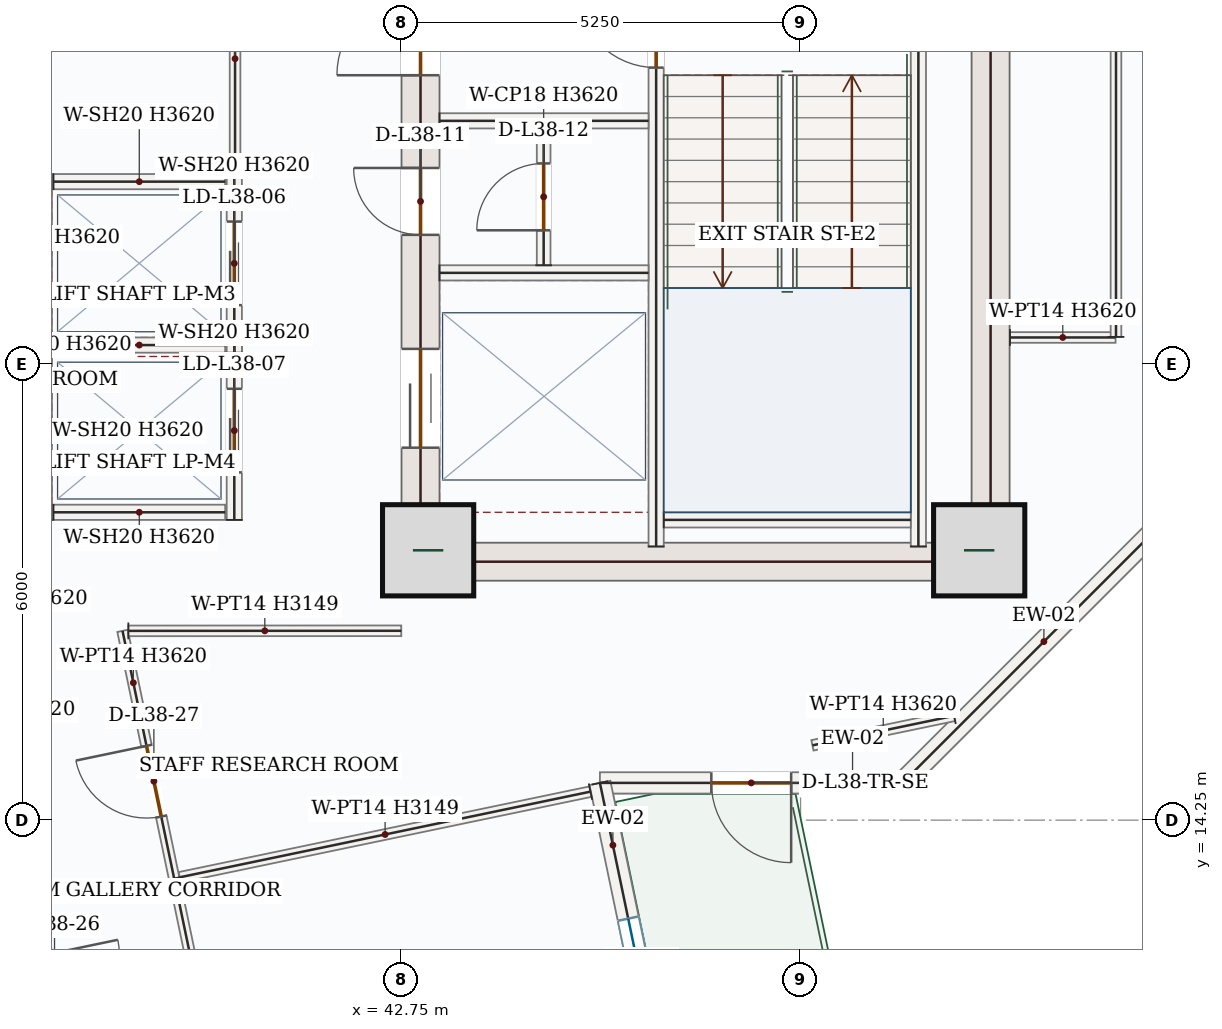
"""IFC4 building model, lengths in metres.
Left out: names, types, materials, properties, quantities, classifications, styles, units other than length and angle.
Written with IfcOpenShell. Run it as: python <this file> out.ifc"""

import sys

from ifc_helpers import new_model, si_unit, direction, frame, frame_2d, origin, origin_2d, place, context, subcontext, project, spatial, rectangle, extrude, source, transform, mapped, element, fill, save


model = new_model("IFC4")
c1 = context("Model", 3, precision=1e-05, world=origin(), true_north=direction((0.0, 1.0)))
c2 = subcontext(c1, "Body", "Model", "MODEL_VIEW")
j1 = project(units=[si_unit("LENGTHUNIT", "METRE"), si_unit("PLANEANGLEUNIT", "RADIAN")], contexts=[c1])
p1 = place(None, origin())
s1 = spatial("IfcSite", under=j1, at=p1, CompositionType="ELEMENT")
p2 = place(p1, origin())
s2 = spatial("IfcBuilding", under=s1, at=p2, CompositionType="ELEMENT")
p3 = place(p2, frame((0.0, 0.0, 166.8)))
s3 = spatial("IfcBuildingStorey", under=s2, at=p3, CompositionType="ELEMENT", Elevation=166.8)
p4 = place(p3, frame((43.0, 17.4, 0.0), z_axis=(0.0, 0.0, 1.0), x_axis=(0.0, 1.0, 0.0)))
e1 = element("IfcWall", 1, at=p4, inside=s3, PredefinedType="SHEAR", context=c2, shape_type="SweptSolid", body=[
    extrude(rectangle(XDim=8.55, YDim=0.5, at=frame_2d((4.275, 0.0))), origin(), (0.0, 0.0, 1.0), 3.62),
])
p5 = place(p4, frame((6.65, 0.0, 0.0)))
e2 = element("IfcOpeningElement", 2, at=p5, cuts=e1, PredefinedType="OPENING", context=c2, shape_type="SweptSolid", body=[
    extrude(rectangle(XDim=1.1, YDim=2.2, at=frame_2d((0.55, 1.1))), frame((0.0, 0.26, 0.0), z_axis=(0.0, -1.0, 0.0), x_axis=(1.0, 0.0, 0.0)), (0.0, 0.0, 1.0), 0.52),
])
p6 = place(p4, frame((1.75, 0.0, 0.0)))
e3 = element("IfcOpeningElement", 3, at=p6, cuts=e1, PredefinedType="OPENING", context=c2, shape_type="SweptSolid", body=[
    extrude(rectangle(XDim=1.3, YDim=2.2, at=frame_2d((0.65, 1.1))), frame((0.0, 0.26, 0.0), z_axis=(0.0, -1.0, 0.0), x_axis=(1.0, 0.0, 0.0)), (0.0, 0.0, 1.0), 0.52),
])
p7 = place(p4, frame((4.55, 0.0, 0.0)))
e4 = element("IfcOpeningElement", 4, at=p7, cuts=e1, PredefinedType="OPENING", context=c2, shape_type="SweptSolid", body=[
    extrude(rectangle(XDim=0.88, YDim=2.1, at=frame_2d((0.44, 1.05))), frame((0.0, 0.26, 0.0), z_axis=(0.0, -1.0, 0.0), x_axis=(1.0, 0.0, 0.0)), (0.0, 0.0, 1.0), 0.52),
])
m1 = source(origin(), c2, "Body", "SweptSolid", [
    extrude(rectangle(XDim=8.55, YDim=0.5, at=frame_2d((4.275, 0.0))), origin(), (0.0, 0.0, 1.0), 3.62),
])
p8 = place(p3, frame((50.5, 17.4, 0.0), z_axis=(0.0, 0.0, 1.0), x_axis=(0.0, 1.0, 0.0)))
e5 = element("IfcWall", 5, at=p8, inside=s3, PredefinedType="SHEAR", context=c2, shape_type="MappedRepresentation", body=[
    mapped(m1, transform((0.0, 0.0, 0.0), x_axis=(1.0, 0.0, 0.0), y_axis=(0.0, 1.0, 0.0), z_axis=(0.0, 0.0, 1.0), scale=1.0)),
])
m2 = source(origin(), c2, "Body", "SweptSolid", [
    extrude(rectangle(XDim=7.0, YDim=0.5, at=frame_2d((3.5, 0.0))), origin(), (0.0, 0.0, 1.0), 3.62),
])
p9 = place(p3, frame((43.25, 17.65, 0.0), z_axis=(0.0, 0.0, 1.0), x_axis=(1.0, 0.0, 0.0)))
e6 = element("IfcWall", 6, at=p9, inside=s3, PredefinedType="SHEAR", context=c2, shape_type="MappedRepresentation", body=[
    mapped(m2, transform((0.0, 0.0, 0.0), x_axis=(1.0, 0.0, 0.0), y_axis=(0.0, 1.0, 0.0), z_axis=(0.0, 0.0, 1.0), scale=1.0)),
])
m3 = source(origin(), c2, "Body", "SweptSolid", [
    extrude(rectangle(XDim=1.2, YDim=1.2, at=origin_2d()), origin(), (0.0, 0.0, 1.0), 3.9),
])
for number, where, z_axis, x_axis in (
    (7, (43.1, 17.8, 0.0), (0.0, 0.0, 1.0), (1.0, 0.0, 0.0)),
    (8, (50.35, 17.8, 0.0), (0.0, 0.0, 1.0), (1.0, 0.0, 0.0)),
):
    element("IfcColumn", number, at=place(p3, frame(where, z_axis=z_axis, x_axis=x_axis)), inside=s3, PredefinedType="COLUMN", context=c2, shape_type="MappedRepresentation", body=[
        mapped(m3, transform((0.0, 0.0, 0.0), x_axis=(1.0, 0.0, 0.0), y_axis=(0.0, 1.0, 0.0), z_axis=(0.0, 0.0, 1.0), scale=1.0)),
    ])
m4 = source(origin(), c2, "Body", "SweptSolid", [
    extrude(rectangle(XDim=5.258, YDim=0.28, at=frame_2d((2.629, 0.0))), origin(), (0.0, 0.0, 1.0), 3.62),
])
p10 = place(p3, frame((53.06, 18.458, 0.0), z_axis=(0.0, 0.0, 1.0), x_axis=(-0.707106781187, -0.707106781187, 0.0)))
e9 = element("IfcWall", 9, at=p10, inside=s3, PredefinedType="SOLIDWALL", context=c2, shape_type="MappedRepresentation", body=[
    mapped(m4, transform((0.0, 0.0, 0.0), x_axis=(1.0, 0.0, 0.0), y_axis=(0.0, 1.0, 0.0), z_axis=(0.0, 0.0, 1.0), scale=1.0)),
])
p11 = place(p3, frame((49.342, 14.74, 0.0), z_axis=(0.0, 0.0, 1.0), x_axis=(-1.0, 0.0, 0.0)))
e10 = element("IfcWall", 10, at=p11, inside=s3, PredefinedType="SOLIDWALL", context=c2, shape_type="SweptSolid", body=[
    extrude(rectangle(XDim=3.982, YDim=0.28, at=frame_2d((1.991, 0.0))), origin(), (0.0, 0.0, 1.0), 3.62),
])
p12 = place(p11, frame((1.466, 0.0, 0.0)))
e11 = element("IfcOpeningElement", 11, at=p12, cuts=e10, PredefinedType="OPENING", context=c2, shape_type="SweptSolid", body=[
    extrude(rectangle(XDim=1.05, YDim=2.15, at=frame_2d((0.525, 1.075))), frame((0.0, 0.15, 0.0), z_axis=(0.0, -1.0, 0.0), x_axis=(1.0, 0.0, 0.0)), (0.0, 0.0, 1.0), 0.3),
])
p13 = place(p3, frame((45.36, 14.74, 0.0), z_axis=(0.0, 0.0, 1.0), x_axis=(0.204151126022, -0.978939384101, 0.0)))
e12 = element("IfcWall", 12, at=p13, inside=s3, PredefinedType="SOLIDWALL", context=c2, shape_type="SweptSolid", body=[
    extrude(rectangle(XDim=5.447, YDim=0.28, at=frame_2d((2.724, 0.0))), origin(), (0.0, 0.0, 1.0), 3.62),
])
p14 = place(p13, frame((1.824, 0.0, 0.85)))
e13 = element("IfcOpeningElement", 13, at=p14, cuts=e12, PredefinedType="OPENING", context=c2, shape_type="SweptSolid", body=[
    extrude(rectangle(XDim=1.8, YDim=1.75, at=frame_2d((0.9, 0.875))), frame((0.0, 0.15, 0.0), z_axis=(0.0, -1.0, 0.0), x_axis=(1.0, 0.0, 0.0)), (0.0, 0.0, 1.0), 0.3),
])
m5 = source(origin(), c2, "Body", "SweptSolid", [
    extrude(rectangle(XDim=7.87, YDim=0.2, at=frame_2d((3.935, 0.0))), origin(), (0.0, 0.0, 1.0), 3.62),
])
p15 = place(p3, frame((49.55, 17.85, 0.0), z_axis=(0.0, 0.0, 1.0), x_axis=(0.0, 1.0, 0.0)))
e14 = element("IfcWall", 14, at=p15, inside=s3, PredefinedType="SOLIDWALL", context=c2, shape_type="MappedRepresentation", body=[
    mapped(m5, transform((0.0, 0.0, 0.0), x_axis=(1.0, 0.0, 0.0), y_axis=(0.0, 1.0, 0.0), z_axis=(0.0, 0.0, 1.0), scale=1.0)),
])
p16 = place(p3, frame((46.1, 17.85, 0.0), z_axis=(0.0, 0.0, 1.0), x_axis=(0.0, 1.0, 0.0)))
e15 = element("IfcWall", 15, at=p16, inside=s3, PredefinedType="SOLIDWALL", context=c2, shape_type="SweptSolid", body=[
    extrude(rectangle(XDim=8.0, YDim=0.2, at=frame_2d((4.0, 0.0))), origin(), (0.0, 0.0, 1.0), 3.62),
])
p17 = place(p16, frame((6.3, 0.0, 0.0)))
e16 = element("IfcOpeningElement", 16, at=p17, cuts=e15, PredefinedType="OPENING", context=c2, shape_type="SweptSolid", body=[
    extrude(rectangle(XDim=1.05, YDim=2.15, at=frame_2d((0.525, 1.075))), frame((0.0, 0.11, 0.0), z_axis=(0.0, -1.0, 0.0), x_axis=(1.0, 0.0, 0.0)), (0.0, 0.0, 1.0), 0.22),
])
m6 = source(origin(), c2, "Body", "SweptSolid", [
    extrude(rectangle(XDim=3.25, YDim=0.2, at=frame_2d((1.625, 0.0))), origin(), (0.0, 0.0, 1.0), 3.62),
])
p18 = place(p3, frame((46.2, 18.2, 0.0), z_axis=(0.0, 0.0, 1.0), x_axis=(1.0, 0.0, 0.0)))
e17 = element("IfcWall", 17, at=p18, inside=s3, PredefinedType="SOLIDWALL", context=c2, shape_type="MappedRepresentation", body=[
    mapped(m6, transform((0.0, 0.0, 0.0), x_axis=(1.0, 0.0, 0.0), y_axis=(0.0, 1.0, 0.0), z_axis=(0.0, 0.0, 1.0), scale=1.0)),
])
m7 = source(origin(), c2, "Body", "SweptSolid", [
    extrude(rectangle(XDim=2.75, YDim=0.2, at=frame_2d((1.375, 0.0))), origin(), (0.0, 0.0, 1.0), 3.62),
])
for number, where, z_axis, x_axis in (
    (18, (43.25, 23.45, 0.0), (0.0, 0.0, 1.0), (1.0, 0.0, 0.0)),
    (19, (43.25, 21.45, 0.0), (0.0, 0.0, 1.0), (1.0, 0.0, 0.0)),
):
    element("IfcWall", number, at=place(p3, frame(where, z_axis=z_axis, x_axis=x_axis)), inside=s3, PredefinedType="SOLIDWALL", context=c2, shape_type="MappedRepresentation", body=[
        mapped(m7, transform((0.0, 0.0, 0.0), x_axis=(1.0, 0.0, 0.0), y_axis=(0.0, 1.0, 0.0), z_axis=(0.0, 0.0, 1.0), scale=1.0)),
    ])
p19 = place(p3, frame((44.62, 21.55, 0.0), z_axis=(0.0, 0.0, 1.0), x_axis=(0.0, 1.0, 0.0)))
e20 = element("IfcWall", 20, at=p19, inside=s3, PredefinedType="PARTITIONING", context=c2, shape_type="SweptSolid", body=[
    extrude(rectangle(XDim=1.8, YDim=0.18, at=frame_2d((0.9, 0.0))), origin(), (0.0, 0.0, 1.0), 3.62),
])
p20 = place(p19, frame((0.46, 0.0, 0.0)))
e21 = element("IfcOpeningElement", 21, at=p20, cuts=e20, PredefinedType="OPENING", context=c2, shape_type="SweptSolid", body=[
    extrude(rectangle(XDim=0.88, YDim=2.1, at=frame_2d((0.44, 1.05))), frame((0.0, 0.1, 0.0), z_axis=(0.0, -1.0, 0.0), x_axis=(1.0, 0.0, 0.0)), (0.0, 0.0, 1.0), 0.2),
])
p21 = place(p3, frame((40.55, 20.4, 0.0), z_axis=(0.0, 0.0, 1.0), x_axis=(0.0, 1.0, 0.0)))
e22 = element("IfcWall", 22, at=p21, inside=s3, PredefinedType="SOLIDWALL", context=c2, shape_type="SweptSolid", body=[
    extrude(rectangle(XDim=2.35, YDim=0.2, at=frame_2d((1.175, 0.0))), origin(), (0.0, 0.0, 1.0), 3.62),
])
p22 = place(p21, frame((0.625, 0.0, 0.0)))
e23 = element("IfcOpeningElement", 23, at=p22, cuts=e22, PredefinedType="OPENING", context=c2, shape_type="SweptSolid", body=[
    extrude(rectangle(XDim=1.1, YDim=2.15, at=frame_2d((0.55, 1.075))), frame((0.0, 0.11, 0.0), z_axis=(0.0, -1.0, 0.0), x_axis=(1.0, 0.0, 0.0)), (0.0, 0.0, 1.0), 0.22),
])
m8 = source(origin(), c2, "Body", "SweptSolid", [
    extrude(rectangle(XDim=2.26, YDim=0.2, at=frame_2d((1.13, 0.0))), origin(), (0.0, 0.0, 1.0), 3.62),
])
for number, where, z_axis, x_axis in (
    (24, (38.17, 20.5, 0.0), (0.0, 0.0, 1.0), (1.0, 0.0, 0.0)),
    (25, (38.17, 22.65, 0.0), (0.0, 0.0, 1.0), (1.0, 0.0, 0.0)),
):
    element("IfcWall", number, at=place(p3, frame(where, z_axis=z_axis, x_axis=x_axis)), inside=s3, PredefinedType="SOLIDWALL", context=c2, shape_type="MappedRepresentation", body=[
        mapped(m8, transform((0.0, 0.0, 0.0), x_axis=(1.0, 0.0, 0.0), y_axis=(0.0, 1.0, 0.0), z_axis=(0.0, 0.0, 1.0), scale=1.0)),
    ])
p23 = place(p3, frame((40.55, 18.2, 0.0), z_axis=(0.0, 0.0, 1.0), x_axis=(0.0, 1.0, 0.0)))
e26 = element("IfcWall", 26, at=p23, inside=s3, PredefinedType="SOLIDWALL", context=c2, shape_type="SweptSolid", body=[
    extrude(rectangle(XDim=2.35, YDim=0.2, at=frame_2d((1.175, 0.0))), origin(), (0.0, 0.0, 1.0), 3.62),
])
p24 = place(p23, frame((0.625, 0.0, 0.0)))
e27 = element("IfcOpeningElement", 27, at=p24, cuts=e26, PredefinedType="OPENING", context=c2, shape_type="SweptSolid", body=[
    extrude(rectangle(XDim=1.1, YDim=2.15, at=frame_2d((0.55, 1.075))), frame((0.0, 0.11, 0.0), z_axis=(0.0, -1.0, 0.0), x_axis=(1.0, 0.0, 0.0)), (0.0, 0.0, 1.0), 0.22),
])
p25 = place(p3, frame((38.17, 18.3, 0.0), z_axis=(0.0, 0.0, 1.0), x_axis=(1.0, 0.0, 0.0)))
e28 = element("IfcWall", 28, at=p25, inside=s3, PredefinedType="SOLIDWALL", context=c2, shape_type="MappedRepresentation", body=[
    mapped(m8, transform((0.0, 0.0, 0.0), x_axis=(1.0, 0.0, 0.0), y_axis=(0.0, 1.0, 0.0), z_axis=(0.0, 0.0, 1.0), scale=1.0)),
])
m9 = source(origin(), c2, "Body", "SweptSolid", [
    extrude(rectangle(XDim=3.035, YDim=0.14, at=frame_2d((1.518, 0.0))), origin(), (0.0, 0.0, 1.0), 3.62),
])
p26 = place(p3, frame((40.56, 25.785, 0.0), z_axis=(0.0, 0.0, 1.0), x_axis=(0.0, -1.0, 0.0)))
e29 = element("IfcWall", 29, at=p26, inside=s3, PredefinedType="PARTITIONING", context=c2, shape_type="MappedRepresentation", body=[
    mapped(m9, transform((0.0, 0.0, 0.0), x_axis=(1.0, 0.0, 0.0), y_axis=(0.0, 1.0, 0.0), z_axis=(0.0, 0.0, 1.0), scale=1.0)),
])
p27 = place(p3, frame((39.759, 13.483, 0.0), z_axis=(0.0, 0.0, 1.0), x_axis=(-0.204124193585, 0.97894500029, 0.0)))
e30 = element("IfcWall", 30, at=p27, inside=s3, PredefinedType="PARTITIONING", context=c2, shape_type="SweptSolid", body=[
    extrude(rectangle(XDim=3.327, YDim=0.14, at=frame_2d((1.664, 0.0))), origin(), (0.0, 0.0, 1.0), 3.62),
])
p28 = place(p27, frame((0.832, 0.0, 0.0)))
e31 = element("IfcOpeningElement", 31, at=p28, cuts=e30, PredefinedType="OPENING", context=c2, shape_type="SweptSolid", body=[
    extrude(rectangle(XDim=0.95, YDim=2.15, at=frame_2d((0.475, 1.075))), frame((0.0, 0.08, 0.0), z_axis=(0.0, -1.0, 0.0), x_axis=(1.0, 0.0, 0.0)), (0.0, 0.0, 1.0), 0.16),
])
m10 = source(origin(), c2, "Body", "SweptSolid", [
    extrude(rectangle(XDim=3.591, YDim=0.14, at=frame_2d((1.795, 0.0))), origin(), (0.0, 0.0, 1.0), 3.149),
])
p29 = place(p3, frame((39.156, 16.74, 0.0), z_axis=(0.0, 0.0, 1.0), x_axis=(0.999999942209, 0.000339974142, 0.0)))
e32 = element("IfcWall", 32, at=p29, inside=s3, PredefinedType="PARTITIONING", context=c2, shape_type="MappedRepresentation", body=[
    mapped(m10, transform((0.0, 0.0, 0.0), x_axis=(1.0, 0.0, 0.0), y_axis=(0.0, 1.0, 0.0), z_axis=(0.0, 0.0, 1.0), scale=1.0)),
])
m11 = source(origin(), c2, "Body", "SweptSolid", [
    extrude(rectangle(XDim=1.903, YDim=0.14, at=frame_2d((0.952, 0.0))), origin(), (0.0, 0.0, 1.0), 3.62),
])
p30 = place(p3, frame((50.019, 15.623, 0.0), z_axis=(0.0, 0.0, 1.0), x_axis=(-0.978929167673, -0.204200109399, 0.0)))
e33 = element("IfcWall", 33, at=p30, inside=s3, PredefinedType="PARTITIONING", context=c2, shape_type="MappedRepresentation", body=[
    mapped(m11, transform((0.0, 0.0, 0.0), x_axis=(1.0, 0.0, 0.0), y_axis=(0.0, 1.0, 0.0), z_axis=(0.0, 0.0, 1.0), scale=1.0)),
])
m12 = source(origin(), c2, "Body", "SweptSolid", [
    extrude(rectangle(XDim=5.52, YDim=0.14, at=frame_2d((2.76, 0.0))), origin(), (0.0, 0.0, 1.0), 3.149),
])
p31 = place(p3, frame((45.236, 14.625, 0.0), z_axis=(0.0, 0.0, 1.0), x_axis=(-0.97893845252, -0.204155593062, 0.0)))
e34 = element("IfcWall", 34, at=p31, inside=s3, PredefinedType="PARTITIONING", context=c2, shape_type="MappedRepresentation", body=[
    mapped(m12, transform((0.0, 0.0, 0.0), x_axis=(1.0, 0.0, 0.0), y_axis=(0.0, 1.0, 0.0), z_axis=(0.0, 0.0, 1.0), scale=1.0)),
])
p32 = place(p3, frame((41.182, 6.657, 0.0), z_axis=(0.0, 0.0, 1.0), x_axis=(-0.204158980406, 0.97893774609, 0.0)))
e35 = element("IfcWall", 35, at=p32, inside=s3, PredefinedType="PARTITIONING", context=c2, shape_type="SweptSolid", body=[
    extrude(rectangle(XDim=6.953, YDim=0.14, at=frame_2d((3.476, 0.0))), origin(), (0.0, 0.0, 1.0), 3.62),
])
p33 = place(p32, frame((3.001, 0.0, 0.0)))
e36 = element("IfcOpeningElement", 36, at=p33, cuts=e35, PredefinedType="OPENING", context=c2, shape_type="SweptSolid", body=[
    extrude(rectangle(XDim=0.95, YDim=2.15, at=frame_2d((0.475, 1.075))), frame((0.0, 0.08, 0.0), z_axis=(0.0, -1.0, 0.0), x_axis=(1.0, 0.0, 0.0)), (0.0, 0.0, 1.0), 0.16),
])
p34 = place(p3, frame((37.778, 13.969, 0.0), z_axis=(0.0, 0.0, 1.0), x_axis=(0.204175249208, -0.978934353065, 0.0)))
e37 = element("IfcWall", 37, at=p34, inside=s3, PredefinedType="PARTITIONING", context=c2, shape_type="SweptSolid", body=[
    extrude(rectangle(XDim=7.853, YDim=0.14, at=frame_2d((3.926, 0.0))), origin(), (0.0, 0.0, 1.0), 3.62),
])
p35 = place(p34, frame((1.519, 0.0, 0.0)))
e38 = element("IfcOpeningElement", 38, at=p35, cuts=e37, PredefinedType="OPENING", context=c2, shape_type="SweptSolid", body=[
    extrude(rectangle(XDim=0.95, YDim=2.15, at=frame_2d((0.475, 1.075))), frame((0.0, 0.08, 0.0), z_axis=(0.0, -1.0, 0.0), x_axis=(1.0, 0.0, 0.0)), (0.0, 0.0, 1.0), 0.16),
])
m13 = source(origin(), c2, "Body", "SweptSolid", [
    extrude(rectangle(XDim=1.389, YDim=0.14, at=frame_2d((0.695, 0.0))), origin(), (0.0, 0.0, 1.0), 3.62),
])
p36 = place(p3, frame((50.755, 20.6, 0.0), z_axis=(0.0, 0.0, 1.0), x_axis=(1.0, 0.0, 0.0)))
e39 = element("IfcWall", 39, at=p36, inside=s3, PredefinedType="PARTITIONING", context=c2, shape_type="MappedRepresentation", body=[
    mapped(m13, transform((0.0, 0.0, 0.0), x_axis=(1.0, 0.0, 0.0), y_axis=(0.0, 1.0, 0.0), z_axis=(0.0, 0.0, 1.0), scale=1.0)),
])
m14 = source(origin(), c2, "Body", "SweptSolid", [
    extrude(rectangle(XDim=8.821, YDim=0.14, at=frame_2d((4.41, 0.0))), origin(), (0.0, 0.0, 1.0), 2.766),
])
p37 = place(p3, frame((52.15, 20.608, 0.0), z_axis=(0.0, 0.0, 1.0), x_axis=(2.7678596e-05, 0.999999999617, 0.0)))
e40 = element("IfcWall", 40, at=p37, inside=s3, PredefinedType="PARTITIONING", context=c2, shape_type="MappedRepresentation", body=[
    mapped(m14, transform((0.0, 0.0, 0.0), x_axis=(1.0, 0.0, 0.0), y_axis=(0.0, 1.0, 0.0), z_axis=(0.0, 0.0, 1.0), scale=1.0)),
])
m15 = source(origin(), c2, "Body", "SweptSolid", [
    extrude(rectangle(XDim=1.05, YDim=2.15, at=frame_2d((0.525, 1.075))), frame((0.0, 0.025, 0.0), z_axis=(0.0, -1.0, 0.0), x_axis=(1.0, 0.0, 0.0)), (0.0, 0.0, 1.0), 0.05),
])
p38 = place(p12, origin())
e41 = element("IfcDoor", 41, at=p38, inside=s3, OperationType="SINGLE_SWING_LEFT", PredefinedType="DOOR", context=c2, shape_type="MappedRepresentation", body=[
    mapped(m15, transform((0.0, 0.0, 0.0), x_axis=(1.0, 0.0, 0.0), y_axis=(0.0, 1.0, 0.0), z_axis=(0.0, 0.0, 1.0), scale=1.0)),
])
fill(e11, e41)
m16 = source(origin(), c2, "Body", "SweptSolid", [
    extrude(rectangle(XDim=1.8, YDim=1.75, at=frame_2d((0.9, 0.875))), frame((0.0, 0.03, 0.0), z_axis=(0.0, -1.0, 0.0), x_axis=(1.0, 0.0, 0.0)), (0.0, 0.0, 1.0), 0.06),
])
p39 = place(p14, origin())
e42 = element("IfcWindow", 42, at=p39, inside=s3, PartitioningType="DOUBLE_PANEL_VERTICAL", PredefinedType="WINDOW", context=c2, shape_type="MappedRepresentation", body=[
    mapped(m16, transform((0.0, 0.0, 0.0), x_axis=(1.0, 0.0, 0.0), y_axis=(0.0, 1.0, 0.0), z_axis=(0.0, 0.0, 1.0), scale=1.0)),
])
fill(e13, e42)
p40 = place(p17, origin())
e43 = element("IfcDoor", 43, at=p40, inside=s3, OperationType="SINGLE_SWING_RIGHT", PredefinedType="DOOR", context=c2, shape_type="MappedRepresentation", body=[
    mapped(m15, transform((0.0, 0.0, 0.0), x_axis=(1.0, 0.0, 0.0), y_axis=(0.0, 1.0, 0.0), z_axis=(0.0, 0.0, 1.0), scale=1.0)),
])
fill(e16, e43)
m17 = source(origin(), c2, "Body", "SweptSolid", [
    extrude(rectangle(XDim=1.1, YDim=2.2, at=frame_2d((0.55, 1.1))), frame((0.0, 0.025, 0.0), z_axis=(0.0, -1.0, 0.0), x_axis=(1.0, 0.0, 0.0)), (0.0, 0.0, 1.0), 0.05),
])
p41 = place(p5, origin())
e44 = element("IfcDoor", 44, at=p41, inside=s3, OperationType="SINGLE_SWING_LEFT", PredefinedType="DOOR", context=c2, shape_type="MappedRepresentation", body=[
    mapped(m17, transform((0.0, 0.0, 0.0), x_axis=(1.0, 0.0, 0.0), y_axis=(0.0, 1.0, 0.0), z_axis=(0.0, 0.0, 1.0), scale=1.0)),
])
fill(e2, e44)
m18 = source(origin(), c2, "Body", "SweptSolid", [
    extrude(rectangle(XDim=1.3, YDim=2.2, at=frame_2d((0.65, 1.1))), frame((0.0, 0.025, 0.0), z_axis=(0.0, -1.0, 0.0), x_axis=(1.0, 0.0, 0.0)), (0.0, 0.0, 1.0), 0.05),
])
p42 = place(p6, origin())
e45 = element("IfcDoor", 45, at=p42, inside=s3, OperationType="DOUBLE_DOOR_SLIDING", PredefinedType="DOOR", context=c2, shape_type="MappedRepresentation", body=[
    mapped(m18, transform((0.0, 0.0, 0.0), x_axis=(1.0, 0.0, 0.0), y_axis=(0.0, 1.0, 0.0), z_axis=(0.0, 0.0, 1.0), scale=1.0)),
])
fill(e3, e45)
m19 = source(origin(), c2, "Body", "SweptSolid", [
    extrude(rectangle(XDim=0.88, YDim=2.1, at=frame_2d((0.44, 1.05))), frame((0.0, 0.025, 0.0), z_axis=(0.0, -1.0, 0.0), x_axis=(1.0, 0.0, 0.0)), (0.0, 0.0, 1.0), 0.05),
])
p43 = place(p7, origin())
e46 = element("IfcDoor", 46, at=p43, inside=s3, OperationType="SINGLE_SWING_RIGHT", PredefinedType="DOOR", context=c2, shape_type="MappedRepresentation", body=[
    mapped(m19, transform((0.0, 0.0, 0.0), x_axis=(1.0, 0.0, 0.0), y_axis=(0.0, 1.0, 0.0), z_axis=(0.0, 0.0, 1.0), scale=1.0)),
])
fill(e4, e46)
p44 = place(p20, origin())
e47 = element("IfcDoor", 47, at=p44, inside=s3, OperationType="SINGLE_SWING_LEFT", PredefinedType="DOOR", context=c2, shape_type="MappedRepresentation", body=[
    mapped(m19, transform((0.0, 0.0, 0.0), x_axis=(1.0, 0.0, 0.0), y_axis=(0.0, 1.0, 0.0), z_axis=(0.0, 0.0, 1.0), scale=1.0)),
])
fill(e21, e47)
m20 = source(origin(), c2, "Body", "SweptSolid", [
    extrude(rectangle(XDim=1.1, YDim=2.15, at=frame_2d((0.55, 1.075))), frame((0.0, 0.025, 0.0), z_axis=(0.0, -1.0, 0.0), x_axis=(1.0, 0.0, 0.0)), (0.0, 0.0, 1.0), 0.05),
])
p45 = place(p22, origin())
e48 = element("IfcDoor", 48, at=p45, inside=s3, OperationType="DOUBLE_DOOR_SLIDING", PredefinedType="DOOR", context=c2, shape_type="MappedRepresentation", body=[
    mapped(m20, transform((0.0, 0.0, 0.0), x_axis=(1.0, 0.0, 0.0), y_axis=(0.0, 1.0, 0.0), z_axis=(0.0, 0.0, 1.0), scale=1.0)),
])
fill(e23, e48)
p46 = place(p24, origin())
e49 = element("IfcDoor", 49, at=p46, inside=s3, OperationType="DOUBLE_DOOR_SLIDING", PredefinedType="DOOR", context=c2, shape_type="MappedRepresentation", body=[
    mapped(m20, transform((0.0, 0.0, 0.0), x_axis=(1.0, 0.0, 0.0), y_axis=(0.0, 1.0, 0.0), z_axis=(0.0, 0.0, 1.0), scale=1.0)),
])
fill(e27, e49)
m21 = source(origin(), c2, "Body", "SweptSolid", [
    extrude(rectangle(XDim=0.95, YDim=2.15, at=frame_2d((0.475, 1.075))), frame((0.0, 0.025, 0.0), z_axis=(0.0, -1.0, 0.0), x_axis=(1.0, 0.0, 0.0)), (0.0, 0.0, 1.0), 0.05),
])
p47 = place(p28, origin())
e50 = element("IfcDoor", 50, at=p47, inside=s3, OperationType="SINGLE_SWING_RIGHT", PredefinedType="DOOR", context=c2, shape_type="MappedRepresentation", body=[
    mapped(m21, transform((0.0, 0.0, 0.0), x_axis=(1.0, 0.0, 0.0), y_axis=(0.0, 1.0, 0.0), z_axis=(0.0, 0.0, 1.0), scale=1.0)),
])
fill(e31, e50)
save(model, sys.argv[1])
